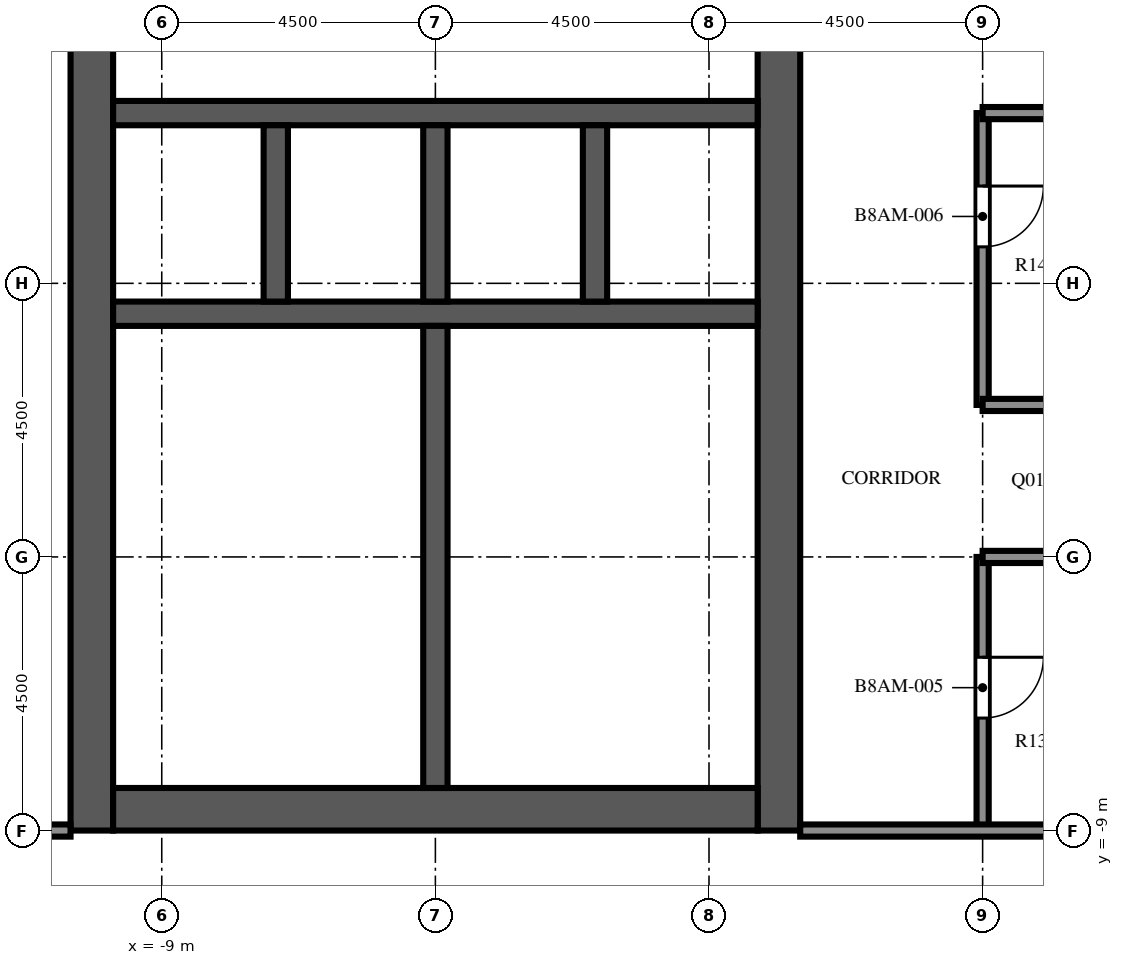
"""IFC4 building model, lengths in metres.
Left out: names, types, materials, properties, quantities, classifications, styles, units other than length and angle.
Written with IfcOpenShell. Run it as: python <this file> out.ifc"""

import sys

from ifc_helpers import new_model, si_unit, direction, frame, frame_2d, origin, place, context, subcontext, project, spatial, rectangle, extrude, element, fill, save


model = new_model("IFC4")
c1 = context("Model", 3, precision=1e-05, world=origin(), true_north=direction((0.0, 1.0)))
c2 = subcontext(c1, "Body", "Model", "MODEL_VIEW")
j1 = project(units=[si_unit("LENGTHUNIT", "METRE"), si_unit("PLANEANGLEUNIT", "RADIAN")], contexts=[c1])
p1 = place(None, origin())
s1 = spatial("IfcSite", under=j1, at=p1, CompositionType="ELEMENT")
p2 = place(p1, origin())
s2 = spatial("IfcBuilding", under=s1, at=p2, CompositionType="ELEMENT")
p3 = place(p2, frame((0.0, 0.0, 295.0)))
s3 = spatial("IfcBuildingStorey", under=s2, at=p3, CompositionType="ELEMENT", Elevation=295.0)
p4 = place(p3, frame((-10.15, -9.0, 0.0), z_axis=(0.0, 0.0, 1.0), x_axis=(0.0, 1.0, 0.0)))
e1 = element("IfcWall", 1, at=p4, inside=s3, PredefinedType="SHEAR", context=c2, shape_type="SweptSolid", body=[
    extrude(rectangle(XDim=27.5, YDim=0.7, at=frame_2d((13.75, 0.0))), origin(), (0.0, 0.0, 1.0), 6.0),
])
p5 = place(p4, frame((12.55, 0.0, 0.0)))
e2 = element("IfcOpeningElement", 2, at=p5, cuts=e1, PredefinedType="OPENING", context=c2, shape_type="SweptSolid", body=[
    extrude(rectangle(XDim=2.4, YDim=2.4, at=frame_2d((1.2, 1.2))), frame((0.0, 0.36, 0.0), z_axis=(0.0, -1.0, 0.0), x_axis=(1.0, 0.0, 0.0)), (0.0, 0.0, 1.0), 0.72),
])
p6 = place(p4, frame((6.825, 0.0, 0.0)))
e3 = element("IfcOpeningElement", 3, at=p6, cuts=e1, PredefinedType="OPENING", context=c2, shape_type="SweptSolid", body=[
    extrude(rectangle(XDim=1.2, YDim=2.1, at=frame_2d((0.6, 1.05))), frame((0.0, 0.36, 0.0), z_axis=(0.0, -1.0, 0.0), x_axis=(1.0, 0.0, 0.0)), (0.0, 0.0, 1.0), 0.72),
])
p7 = place(p4, frame((19.475, 0.0, 0.0)))
e4 = element("IfcOpeningElement", 4, at=p7, cuts=e1, PredefinedType="OPENING", context=c2, shape_type="SweptSolid", body=[
    extrude(rectangle(XDim=1.2, YDim=2.1, at=frame_2d((0.6, 1.05))), frame((0.0, 0.36, 0.0), z_axis=(0.0, -1.0, 0.0), x_axis=(1.0, 0.0, 0.0)), (0.0, 0.0, 1.0), 0.72),
])
p8 = place(p3, frame((1.15, -9.0, 0.0), z_axis=(0.0, 0.0, 1.0), x_axis=(0.0, 1.0, 0.0)))
e5 = element("IfcWall", 5, at=p8, inside=s3, PredefinedType="SHEAR", context=c2, shape_type="SweptSolid", body=[
    extrude(rectangle(XDim=27.5, YDim=0.7, at=frame_2d((13.75, 0.0))), origin(), (0.0, 0.0, 1.0), 6.0),
])
p9 = place(p8, frame((12.55, 0.0, 0.0)))
e6 = element("IfcOpeningElement", 6, at=p9, cuts=e5, PredefinedType="OPENING", context=c2, shape_type="SweptSolid", body=[
    extrude(rectangle(XDim=2.4, YDim=2.4, at=frame_2d((1.2, 1.2))), frame((0.0, 0.36, 0.0), z_axis=(0.0, -1.0, 0.0), x_axis=(1.0, 0.0, 0.0)), (0.0, 0.0, 1.0), 0.72),
])
p10 = place(p8, frame((5.46, 0.0, 0.0)))
e7 = element("IfcOpeningElement", 7, at=p10, cuts=e5, PredefinedType="OPENING", context=c2, shape_type="SweptSolid", body=[
    extrude(rectangle(XDim=0.968, YDim=2.1, at=frame_2d((0.484, 1.05))), frame((0.0, 0.36, 0.0), z_axis=(0.0, -1.0, 0.0), x_axis=(1.0, 0.0, 0.0)), (0.0, 0.0, 1.0), 0.72),
])
p11 = place(p8, frame((23.54, 0.0, 0.0)))
e8 = element("IfcOpeningElement", 8, at=p11, cuts=e5, PredefinedType="OPENING", context=c2, shape_type="SweptSolid", body=[
    extrude(rectangle(XDim=1.2, YDim=2.1, at=frame_2d((0.6, 1.05))), frame((0.0, 0.36, 0.0), z_axis=(0.0, -1.0, 0.0), x_axis=(1.0, 0.0, 0.0)), (0.0, 0.0, 1.0), 0.72),
])
p12 = place(p3, frame((-9.8, -8.65, 0.0), z_axis=(0.0, 0.0, 1.0), x_axis=(1.0, 0.0, 0.0)))
e9 = element("IfcWall", 9, at=p12, inside=s3, PredefinedType="SHEAR", context=c2, shape_type="SweptSolid", body=[
    extrude(rectangle(XDim=10.6, YDim=0.7, at=frame_2d((5.3, 0.0))), origin(), (0.0, 0.0, 1.0), 6.0),
])
p13 = place(p3, frame((-9.8, -0.5, 0.0), z_axis=(0.0, 0.0, 1.0), x_axis=(1.0, 0.0, 0.0)))
e10 = element("IfcWall", 10, at=p13, inside=s3, PredefinedType="SHEAR", context=c2, shape_type="SweptSolid", body=[
    extrude(rectangle(XDim=10.6, YDim=0.4, at=frame_2d((5.3, 0.0))), origin(), (0.0, 0.0, 1.0), 6.0),
])
p14 = place(p3, frame((-9.8, 2.8, 0.0), z_axis=(0.0, 0.0, 1.0), x_axis=(1.0, 0.0, 0.0)))
e11 = element("IfcWall", 11, at=p14, inside=s3, PredefinedType="SHEAR", context=c2, shape_type="SweptSolid", body=[
    extrude(rectangle(XDim=10.6, YDim=0.4, at=frame_2d((5.3, 0.0))), origin(), (0.0, 0.0, 1.0), 6.0),
])
p15 = place(p14, frame((0.688, 0.0, 0.0)))
e12 = element("IfcOpeningElement", 12, at=p15, cuts=e11, PredefinedType="OPENING", context=c2, shape_type="SweptSolid", body=[
    extrude(rectangle(XDim=1.1, YDim=2.1, at=frame_2d((0.55, 1.05))), frame((0.0, 0.21, 0.0), z_axis=(0.0, -1.0, 0.0), x_axis=(1.0, 0.0, 0.0)), (0.0, 0.0, 1.0), 0.42),
])
p16 = place(p14, frame((3.438, 0.0, 0.0)))
e13 = element("IfcOpeningElement", 13, at=p16, cuts=e11, PredefinedType="OPENING", context=c2, shape_type="SweptSolid", body=[
    extrude(rectangle(XDim=1.1, YDim=2.1, at=frame_2d((0.55, 1.05))), frame((0.0, 0.21, 0.0), z_axis=(0.0, -1.0, 0.0), x_axis=(1.0, 0.0, 0.0)), (0.0, 0.0, 1.0), 0.42),
])
p17 = place(p14, frame((6.113, 0.0, 0.0)))
e14 = element("IfcOpeningElement", 14, at=p17, cuts=e11, PredefinedType="OPENING", context=c2, shape_type="SweptSolid", body=[
    extrude(rectangle(XDim=1.0, YDim=2.1, at=frame_2d((0.5, 1.05))), frame((0.0, 0.21, 0.0), z_axis=(0.0, -1.0, 0.0), x_axis=(1.0, 0.0, 0.0)), (0.0, 0.0, 1.0), 0.42),
])
p18 = place(p14, frame((8.863, 0.0, 0.0)))
e15 = element("IfcOpeningElement", 15, at=p18, cuts=e11, PredefinedType="OPENING", context=c2, shape_type="SweptSolid", body=[
    extrude(rectangle(XDim=1.0, YDim=2.1, at=frame_2d((0.5, 1.05))), frame((0.0, 0.21, 0.0), z_axis=(0.0, -1.0, 0.0), x_axis=(1.0, 0.0, 0.0)), (0.0, 0.0, 1.0), 0.42),
])
for number, where, z_axis, x_axis in (
    (16, (-7.125, -0.3, 0.0), (0.0, 0.0, 1.0), (0.0, 1.0, 0.0)),
    (17, (-4.5, -0.3, 0.0), (0.0, 0.0, 1.0), (0.0, 1.0, 0.0)),
    (18, (-1.875, -0.3, 0.0), (0.0, 0.0, 1.0), (0.0, 1.0, 0.0)),
):
    element("IfcWall", number, at=place(p3, frame(where, z_axis=z_axis, x_axis=x_axis)), inside=s3, PredefinedType="SHEAR", context=c2, shape_type="SweptSolid", body=[
        extrude(rectangle(XDim=2.9, YDim=0.4, at=frame_2d((1.45, 0.0))), origin(), (0.0, 0.0, 1.0), 6.0),
    ])
p19 = place(p3, frame((-4.5, -8.3, 0.0), z_axis=(0.0, 0.0, 1.0), x_axis=(0.0, 1.0, 0.0)))
e19 = element("IfcWall", 19, at=p19, inside=s3, PredefinedType="SHEAR", context=c2, shape_type="SweptSolid", body=[
    extrude(rectangle(XDim=7.6, YDim=0.4, at=frame_2d((3.8, 0.0))), origin(), (0.0, 0.0, 1.0), 6.0),
])
p20 = place(p3, frame((-1.75, -3.74, 0.0), z_axis=(0.0, 0.0, 1.0), x_axis=(1.0, 0.0, 0.0)))
e20 = element("IfcWall", 20, at=p20, inside=s3, PredefinedType="PARTITIONING", context=c2, shape_type="SweptSolid", body=[
    extrude(rectangle(XDim=2.55, YDim=0.1, at=frame_2d((1.275, 0.0))), origin(), (0.0, 0.0, 1.0), 5.4),
])
p21 = place(p20, frame((0.775, 0.0, 0.0)))
e21 = element("IfcOpeningElement", 21, at=p21, cuts=e20, PredefinedType="OPENING", context=c2, shape_type="SweptSolid", body=[
    extrude(rectangle(XDim=1.0, YDim=2.1, at=frame_2d((0.5, 1.05))), frame((0.0, 0.06, 0.0), z_axis=(0.0, -1.0, 0.0), x_axis=(1.0, 0.0, 0.0)), (0.0, 0.0, 1.0), 0.12),
])
p22 = place(p3, frame((-4.3, -3.74, 0.0), z_axis=(0.0, 0.0, 1.0), x_axis=(1.0, 0.0, 0.0)))
e22 = element("IfcWall", 22, at=p22, inside=s3, PredefinedType="PARTITIONING", context=c2, shape_type="SweptSolid", body=[
    extrude(rectangle(XDim=2.55, YDim=0.1, at=frame_2d((1.275, 0.0))), origin(), (0.0, 0.0, 1.0), 5.4),
])
p23 = place(p22, frame((0.775, 0.0, 0.0)))
e23 = element("IfcOpeningElement", 23, at=p23, cuts=e22, PredefinedType="OPENING", context=c2, shape_type="SweptSolid", body=[
    extrude(rectangle(XDim=1.0, YDim=2.1, at=frame_2d((0.5, 1.05))), frame((0.0, 0.06, 0.0), z_axis=(0.0, -1.0, 0.0), x_axis=(1.0, 0.0, 0.0)), (0.0, 0.0, 1.0), 0.12),
])
p24 = place(p3, frame((-1.75, -2.372, 0.0), z_axis=(0.0, 0.0, 1.0), x_axis=(1.0, 0.0, 0.0)))
e24 = element("IfcWall", 24, at=p24, inside=s3, PredefinedType="PARTITIONING", context=c2, shape_type="SweptSolid", body=[
    extrude(rectangle(XDim=2.55, YDim=0.1, at=frame_2d((1.275, 0.0))), origin(), (0.0, 0.0, 1.0), 5.4),
])
p25 = place(p24, frame((0.775, 0.0, 0.0)))
e25 = element("IfcOpeningElement", 25, at=p25, cuts=e24, PredefinedType="OPENING", context=c2, shape_type="SweptSolid", body=[
    extrude(rectangle(XDim=1.0, YDim=2.1, at=frame_2d((0.5, 1.05))), frame((0.0, 0.06, 0.0), z_axis=(0.0, -1.0, 0.0), x_axis=(1.0, 0.0, 0.0)), (0.0, 0.0, 1.0), 0.12),
])
p26 = place(p3, frame((-4.3, -2.372, 0.0), z_axis=(0.0, 0.0, 1.0), x_axis=(1.0, 0.0, 0.0)))
e26 = element("IfcWall", 26, at=p26, inside=s3, PredefinedType="PARTITIONING", context=c2, shape_type="SweptSolid", body=[
    extrude(rectangle(XDim=2.55, YDim=0.1, at=frame_2d((1.275, 0.0))), origin(), (0.0, 0.0, 1.0), 5.4),
])
p27 = place(p26, frame((0.775, 0.0, 0.0)))
e27 = element("IfcOpeningElement", 27, at=p27, cuts=e26, PredefinedType="OPENING", context=c2, shape_type="SweptSolid", body=[
    extrude(rectangle(XDim=1.0, YDim=2.1, at=frame_2d((0.5, 1.05))), frame((0.0, 0.06, 0.0), z_axis=(0.0, -1.0, 0.0), x_axis=(1.0, 0.0, 0.0)), (0.0, 0.0, 1.0), 0.12),
])
p28 = place(p3, frame((-1.75, -8.3, 0.0), z_axis=(0.0, 0.0, 1.0), x_axis=(0.0, 1.0, 0.0)))
e28 = element("IfcWall", 28, at=p28, inside=s3, PredefinedType="PARTITIONING", context=c2, shape_type="SweptSolid", body=[
    extrude(rectangle(XDim=4.56, YDim=0.1, at=frame_2d((2.28, 0.0))), origin(), (0.0, 0.0, 1.0), 5.4),
])
p29 = place(p3, frame((-1.75, -2.372, 0.0), z_axis=(0.0, 0.0, 1.0), x_axis=(0.0, 1.0, 0.0)))
e29 = element("IfcWall", 29, at=p29, inside=s3, PredefinedType="PARTITIONING", context=c2, shape_type="SweptSolid", body=[
    extrude(rectangle(XDim=1.672, YDim=0.1, at=frame_2d((0.836, 0.0))), origin(), (0.0, 0.0, 1.0), 5.4),
])
p30 = place(p3, frame((4.5, -4.5, 0.0), z_axis=(0.0, 0.0, 1.0), x_axis=(0.0, -1.0, 0.0)))
e30 = element("IfcWall", 30, at=p30, inside=s3, PredefinedType="PARTITIONING", context=c2, shape_type="SweptSolid", body=[
    extrude(rectangle(XDim=4.5, YDim=0.2, at=frame_2d((2.25, 0.0))), origin(), (0.0, 0.0, 1.0), 5.4),
])
p31 = place(p30, frame((1.65, 0.0, 0.0)))
e31 = element("IfcOpeningElement", 31, at=p31, cuts=e30, PredefinedType="OPENING", context=c2, shape_type="SweptSolid", body=[
    extrude(rectangle(XDim=1.0, YDim=2.1, at=frame_2d((0.5, 1.05))), frame((0.0, 0.11, 0.0), z_axis=(0.0, -1.0, 0.0), x_axis=(1.0, 0.0, 0.0)), (0.0, 0.0, 1.0), 0.22),
])
p32 = place(p3, frame((4.5, 2.8, 0.0), z_axis=(0.0, 0.0, 1.0), x_axis=(0.0, -1.0, 0.0)))
e32 = element("IfcWall", 32, at=p32, inside=s3, PredefinedType="PARTITIONING", context=c2, shape_type="SweptSolid", body=[
    extrude(rectangle(XDim=4.8, YDim=0.2, at=frame_2d((2.4, 0.0))), origin(), (0.0, 0.0, 1.0), 5.4),
])
p33 = place(p32, frame((1.2, 0.0, 0.0)))
e33 = element("IfcOpeningElement", 33, at=p33, cuts=e32, PredefinedType="OPENING", context=c2, shape_type="SweptSolid", body=[
    extrude(rectangle(XDim=1.0, YDim=2.1, at=frame_2d((0.5, 1.05))), frame((0.0, 0.11, 0.0), z_axis=(0.0, -1.0, 0.0), x_axis=(1.0, 0.0, 0.0)), (0.0, 0.0, 1.0), 0.22),
])
p34 = place(p3, frame((-10.5, -9.0, 0.0), z_axis=(0.0, 0.0, 1.0), x_axis=(-1.0, 0.0, 0.0)))
e34 = element("IfcWall", 34, at=p34, inside=s3, PredefinedType="PARTITIONING", context=c2, shape_type="SweptSolid", body=[
    extrude(rectangle(XDim=3.0, YDim=0.2, at=frame_2d((1.5, 0.0))), origin(), (0.0, 0.0, 1.0), 5.4),
])
p35 = place(p34, frame((0.65, 0.0, 0.0)))
e35 = element("IfcOpeningElement", 35, at=p35, cuts=e34, PredefinedType="OPENING", context=c2, shape_type="SweptSolid", body=[
    extrude(rectangle(XDim=1.0, YDim=2.1, at=frame_2d((0.5, 1.05))), frame((0.0, 0.11, 0.0), z_axis=(0.0, -1.0, 0.0), x_axis=(1.0, 0.0, 0.0)), (0.0, 0.0, 1.0), 0.22),
])
p36 = place(p3, frame((1.5, -9.0, 0.0), z_axis=(0.0, 0.0, 1.0), x_axis=(1.0, 0.0, 0.0)))
e36 = element("IfcWall", 36, at=p36, inside=s3, PredefinedType="PARTITIONING", context=c2, shape_type="SweptSolid", body=[
    extrude(rectangle(XDim=4.5, YDim=0.2, at=frame_2d((2.25, 0.0))), origin(), (0.0, 0.0, 1.0), 5.4),
])
for number, where, z_axis, x_axis in (
    (37, (4.5, -4.5, 0.0), (0.0, 0.0, 1.0), (1.0, 0.0, 0.0)),
    (38, (4.5, -2.0, 0.0), (0.0, 0.0, 1.0), (1.0, 0.0, 0.0)),
    (39, (4.5, 2.8, 0.0), (0.0, 0.0, 1.0), (1.0, 0.0, 0.0)),
):
    element("IfcWall", number, at=place(p3, frame(where, z_axis=z_axis, x_axis=x_axis)), inside=s3, PredefinedType="PARTITIONING", context=c2, shape_type="SweptSolid", body=[
        extrude(rectangle(XDim=1.5, YDim=0.2, at=frame_2d((0.75, 0.0))), origin(), (0.0, 0.0, 1.0), 5.4),
    ])
p37 = place(p15, origin())
e40 = element("IfcDoor", 40, at=p37, inside=s3, OperationType="DOUBLE_DOOR_SLIDING", PredefinedType="DOOR", context=c2, shape_type="SweptSolid", body=[
    extrude(rectangle(XDim=1.1, YDim=2.1, at=frame_2d((0.55, 1.05))), frame((0.0, 0.025, 0.0), z_axis=(0.0, -1.0, 0.0), x_axis=(1.0, 0.0, 0.0)), (0.0, 0.0, 1.0), 0.05),
])
fill(e12, e40)
p38 = place(p16, origin())
e41 = element("IfcDoor", 41, at=p38, inside=s3, OperationType="DOUBLE_DOOR_SLIDING", PredefinedType="DOOR", context=c2, shape_type="SweptSolid", body=[
    extrude(rectangle(XDim=1.1, YDim=2.1, at=frame_2d((0.55, 1.05))), frame((0.0, 0.025, 0.0), z_axis=(0.0, -1.0, 0.0), x_axis=(1.0, 0.0, 0.0)), (0.0, 0.0, 1.0), 0.05),
])
fill(e13, e41)
p39 = place(p5, origin())
e42 = element("IfcDoor", 42, at=p39, inside=s3, OperationType="DOUBLE_DOOR_DOUBLE_SWING", PredefinedType="DOOR", context=c2, shape_type="SweptSolid", body=[
    extrude(rectangle(XDim=2.4, YDim=2.4, at=frame_2d((1.2, 1.2))), frame((0.0, 0.025, 0.0), z_axis=(0.0, -1.0, 0.0), x_axis=(1.0, 0.0, 0.0)), (0.0, 0.0, 1.0), 0.05),
])
fill(e2, e42)
p40 = place(p9, origin())
e43 = element("IfcDoor", 43, at=p40, inside=s3, OperationType="DOUBLE_DOOR_DOUBLE_SWING", PredefinedType="DOOR", context=c2, shape_type="SweptSolid", body=[
    extrude(rectangle(XDim=2.4, YDim=2.4, at=frame_2d((1.2, 1.2))), frame((0.0, 0.025, 0.0), z_axis=(0.0, -1.0, 0.0), x_axis=(1.0, 0.0, 0.0)), (0.0, 0.0, 1.0), 0.05),
])
fill(e6, e43)
p41 = place(p6, origin())
e44 = element("IfcDoor", 44, at=p41, inside=s3, OperationType="SINGLE_SWING_LEFT", PredefinedType="DOOR", context=c2, shape_type="SweptSolid", body=[
    extrude(rectangle(XDim=1.2, YDim=2.1, at=frame_2d((0.6, 1.05))), frame((0.0, 0.025, 0.0), z_axis=(0.0, -1.0, 0.0), x_axis=(1.0, 0.0, 0.0)), (0.0, 0.0, 1.0), 0.05),
])
fill(e3, e44)
p42 = place(p17, origin())
e45 = element("IfcDoor", 45, at=p42, inside=s3, OperationType="SINGLE_SWING_LEFT", PredefinedType="DOOR", context=c2, shape_type="SweptSolid", body=[
    extrude(rectangle(XDim=1.0, YDim=2.1, at=frame_2d((0.5, 1.05))), frame((0.0, 0.025, 0.0), z_axis=(0.0, -1.0, 0.0), x_axis=(1.0, 0.0, 0.0)), (0.0, 0.0, 1.0), 0.05),
])
fill(e14, e45)
p43 = place(p18, origin())
e46 = element("IfcDoor", 46, at=p43, inside=s3, OperationType="SINGLE_SWING_RIGHT", PredefinedType="DOOR", context=c2, shape_type="SweptSolid", body=[
    extrude(rectangle(XDim=1.0, YDim=2.1, at=frame_2d((0.5, 1.05))), frame((0.0, 0.025, 0.0), z_axis=(0.0, -1.0, 0.0), x_axis=(1.0, 0.0, 0.0)), (0.0, 0.0, 1.0), 0.05),
])
fill(e15, e46)
p44 = place(p10, origin())
e47 = element("IfcDoor", 47, at=p44, inside=s3, OperationType="SINGLE_SWING_LEFT", PredefinedType="DOOR", context=c2, shape_type="SweptSolid", body=[
    extrude(rectangle(XDim=0.968, YDim=2.1, at=frame_2d((0.484, 1.05))), frame((0.0, 0.325, 0.0), z_axis=(0.0, -1.0, 0.0), x_axis=(1.0, 0.0, 0.0)), (0.0, 0.0, 1.0), 0.05),
])
fill(e7, e47)
p45 = place(p21, origin())
e48 = element("IfcDoor", 48, at=p45, inside=s3, OperationType="SINGLE_SWING_RIGHT", PredefinedType="DOOR", context=c2, shape_type="SweptSolid", body=[
    extrude(rectangle(XDim=1.0, YDim=2.1, at=frame_2d((0.5, 1.05))), frame((0.0, 0.025, 0.0), z_axis=(0.0, -1.0, 0.0), x_axis=(1.0, 0.0, 0.0)), (0.0, 0.0, 1.0), 0.05),
])
fill(e21, e48)
p46 = place(p23, origin())
e49 = element("IfcDoor", 49, at=p46, inside=s3, OperationType="SINGLE_SWING_LEFT", PredefinedType="DOOR", context=c2, shape_type="SweptSolid", body=[
    extrude(rectangle(XDim=1.0, YDim=2.1, at=frame_2d((0.5, 1.05))), frame((0.0, 0.025, 0.0), z_axis=(0.0, -1.0, 0.0), x_axis=(1.0, 0.0, 0.0)), (0.0, 0.0, 1.0), 0.05),
])
fill(e23, e49)
p47 = place(p25, origin())
e50 = element("IfcDoor", 50, at=p47, inside=s3, OperationType="SINGLE_SWING_RIGHT", PredefinedType="DOOR", context=c2, shape_type="SweptSolid", body=[
    extrude(rectangle(XDim=1.0, YDim=2.1, at=frame_2d((0.5, 1.05))), frame((0.0, 0.025, 0.0), z_axis=(0.0, -1.0, 0.0), x_axis=(1.0, 0.0, 0.0)), (0.0, 0.0, 1.0), 0.05),
])
fill(e25, e50)
p48 = place(p27, origin())
e51 = element("IfcDoor", 51, at=p48, inside=s3, OperationType="SINGLE_SWING_LEFT", PredefinedType="DOOR", context=c2, shape_type="SweptSolid", body=[
    extrude(rectangle(XDim=1.0, YDim=2.1, at=frame_2d((0.5, 1.05))), frame((0.0, 0.025, 0.0), z_axis=(0.0, -1.0, 0.0), x_axis=(1.0, 0.0, 0.0)), (0.0, 0.0, 1.0), 0.05),
])
fill(e27, e51)
p49 = place(p31, origin())
e52 = element("IfcDoor", 52, at=p49, inside=s3, OperationType="SINGLE_SWING_LEFT", PredefinedType="DOOR", context=c2, shape_type="SweptSolid", body=[
    extrude(rectangle(XDim=1.0, YDim=2.1, at=frame_2d((0.5, 1.05))), frame((0.0, 0.025, 0.0), z_axis=(0.0, -1.0, 0.0), x_axis=(1.0, 0.0, 0.0)), (0.0, 0.0, 1.0), 0.05),
])
fill(e31, e52)
p50 = place(p33, origin())
e53 = element("IfcDoor", 53, at=p50, inside=s3, OperationType="SINGLE_SWING_LEFT", PredefinedType="DOOR", context=c2, shape_type="SweptSolid", body=[
    extrude(rectangle(XDim=1.0, YDim=2.1, at=frame_2d((0.5, 1.05))), frame((0.0, 0.025, 0.0), z_axis=(0.0, -1.0, 0.0), x_axis=(1.0, 0.0, 0.0)), (0.0, 0.0, 1.0), 0.05),
])
fill(e33, e53)
save(model, sys.argv[1])
